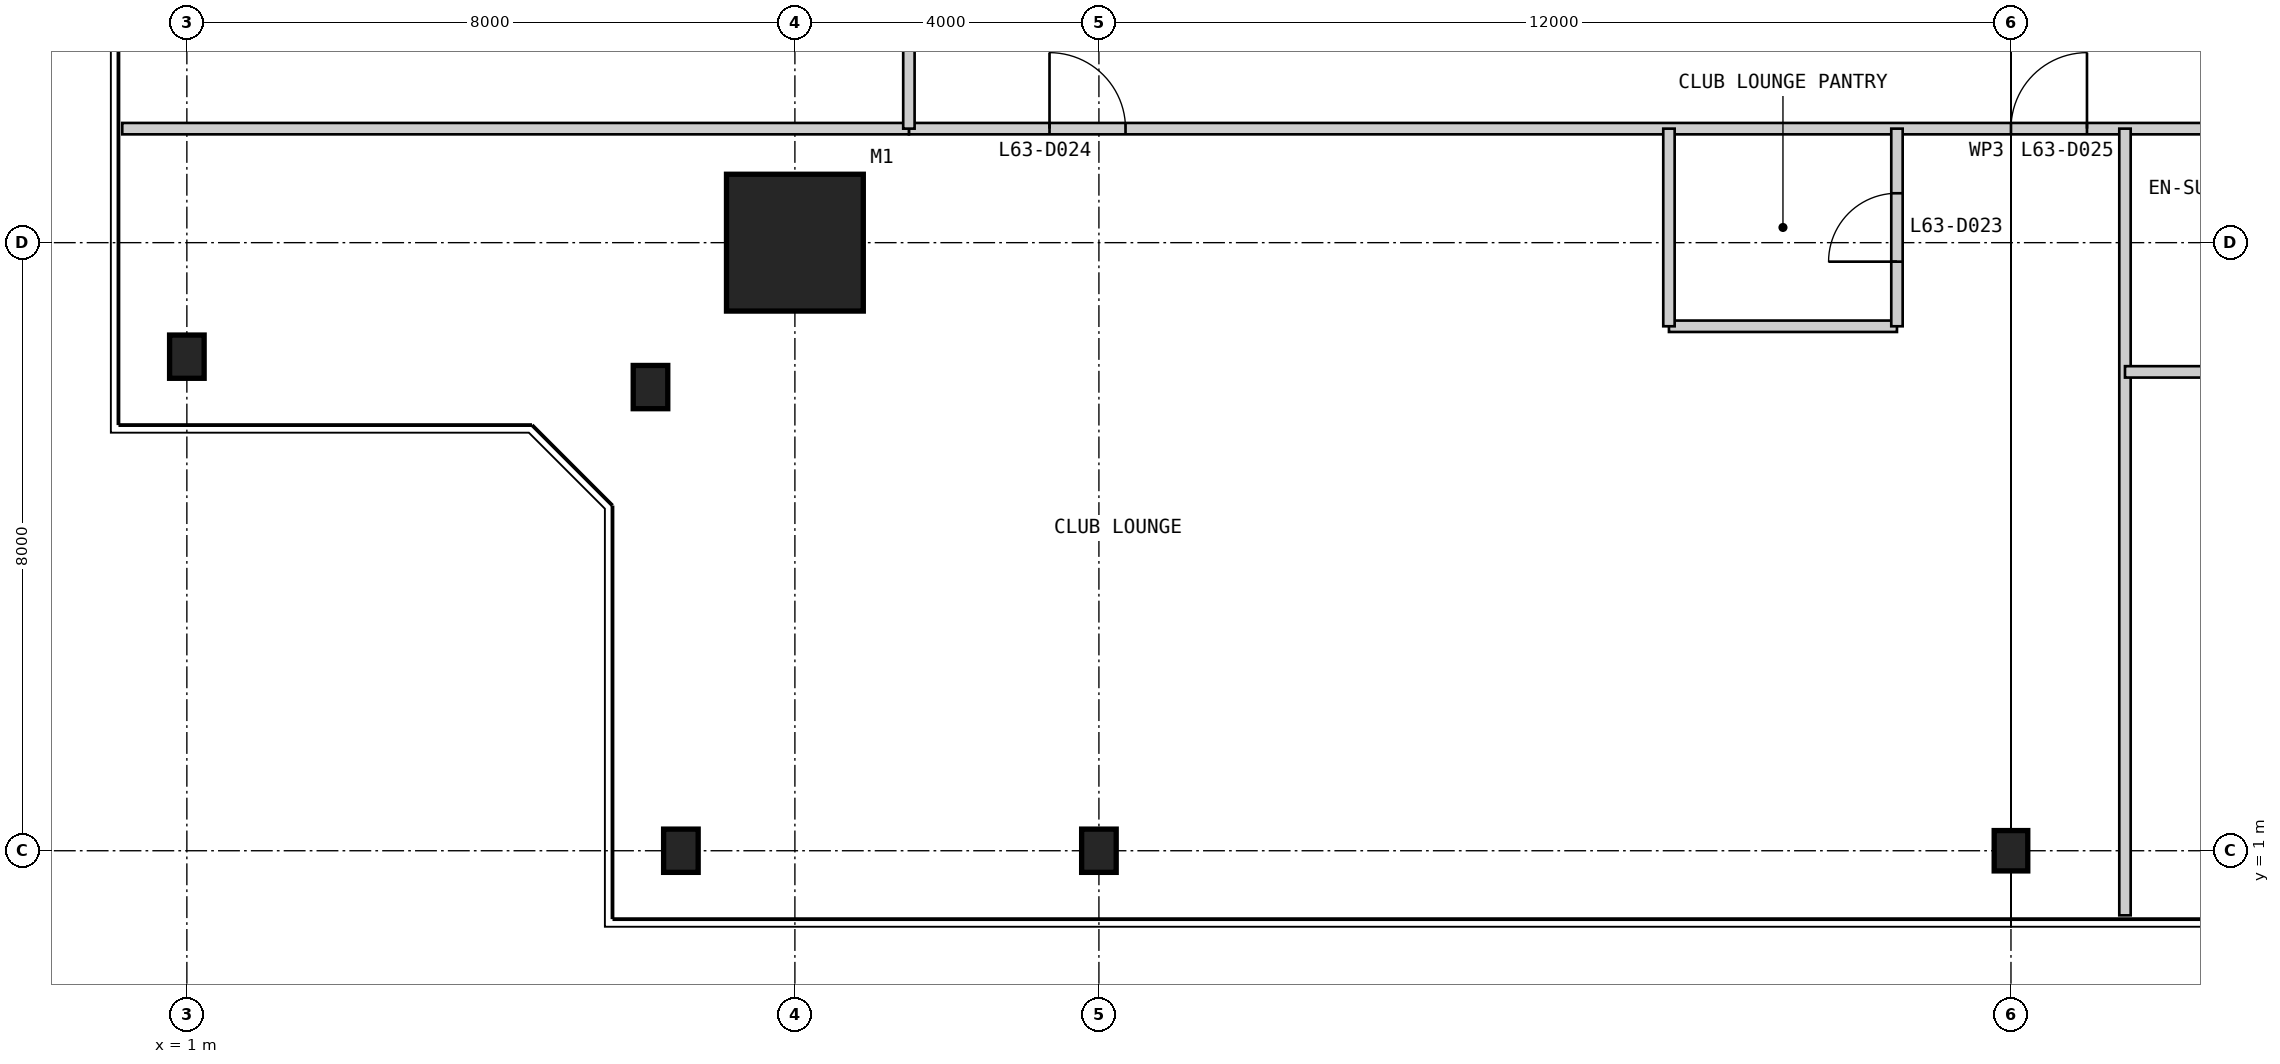
"""IFC4 building model, lengths in metres.
Left out: names, types, materials, properties, quantities, classifications, styles, units other than length and angle.
Written with IfcOpenShell. Run it as: python <this file> out.ifc"""

import sys

from ifc_helpers import new_model, si_unit, direction, frame, frame_2d, origin, origin_2d, place, context, subcontext, project, spatial, rectangle, i_section, extrude, element, fill, save


model = new_model("IFC4")
c1 = context("Model", 3, precision=1e-05, world=origin(), true_north=direction((0.0, 1.0)))
c2 = subcontext(c1, "Body", "Model", "MODEL_VIEW")
j1 = project(units=[si_unit("LENGTHUNIT", "METRE"), si_unit("PLANEANGLEUNIT", "RADIAN")], contexts=[c1])
p1 = place(None, origin())
s1 = spatial("IfcSite", under=j1, at=p1, CompositionType="ELEMENT")
p2 = place(p1, origin())
s2 = spatial("IfcBuilding", under=s1, at=p2, CompositionType="ELEMENT")
p3 = place(p2, frame((0.0, 0.0, 266.2)))
s3 = spatial("IfcBuildingStorey", under=s2, at=p3, CompositionType="ELEMENT", Elevation=266.2)
p4 = place(p3, frame((9.0, 9.0, 0.0), z_axis=(0.0, 0.0, 1.0), x_axis=(1.0, 0.0, 0.0)))
e1 = element("IfcColumn", 1, at=p4, inside=s3, PredefinedType="COLUMN", context=c2, shape_type="SweptSolid", body=[
    extrude(rectangle(XDim=1.8, YDim=1.8, at=origin_2d()), origin(), (0.0, 0.0, 1.0), 3.4),
])
for number, where, z_axis, x_axis in (
    (2, (7.5, 1.0, 0.0), (0.0, 0.0, 1.0), (1.0, 0.0, 0.0)),
    (3, (13.0, 1.0, 0.0), (0.0, 0.0, 1.0), (1.0, 0.0, 0.0)),
):
    element("IfcColumn", number, at=place(p3, frame(where, z_axis=z_axis, x_axis=x_axis)), inside=s3, PredefinedType="COLUMN", context=c2, shape_type="SweptSolid", body=[
        extrude(i_section(OverallWidth=0.455, OverallDepth=0.569, WebThickness=0.078, FlangeThickness=0.125, at=origin_2d()), origin(), (0.0, 0.0, 1.0), 3.4),
    ])
p5 = place(p3, frame((25.0, 1.0, 0.0), z_axis=(0.0, 0.0, 1.0), x_axis=(1.0, 0.0, 0.0)))
e4 = element("IfcColumn", 4, at=p5, inside=s3, PredefinedType="COLUMN", context=c2, shape_type="SweptSolid", body=[
    extrude(i_section(OverallWidth=0.442, OverallDepth=0.531, WebThickness=0.066, FlangeThickness=0.106, at=origin_2d()), origin(), (0.0, 0.0, 1.0), 3.4),
])
for number, where, z_axis, x_axis in (
    (5, (1.0, 7.5, 0.0), (0.0, 0.0, 1.0), (1.0, 0.0, 0.0)),
    (6, (7.1, 7.1, 0.0), (0.0, 0.0, 1.0), (1.0, 0.0, 0.0)),
):
    element("IfcColumn", number, at=place(p3, frame(where, z_axis=z_axis, x_axis=x_axis)), inside=s3, PredefinedType="COLUMN", context=c2, shape_type="SweptSolid", body=[
        extrude(i_section(OverallWidth=0.455, OverallDepth=0.569, WebThickness=0.078, FlangeThickness=0.125, at=origin_2d()), origin(), (0.0, 0.0, 1.0), 3.4),
    ])
p6 = place(p3, frame((10.5, 10.5, 0.0), z_axis=(0.0, 0.0, 1.0), x_axis=(1.0, 0.0, 0.0)))
e7 = element("IfcWall", 7, at=p6, inside=s3, PredefinedType="PARTITIONING", context=c2, shape_type="SweptSolid", body=[
    extrude(rectangle(XDim=29.0, YDim=0.15, at=frame_2d((14.5, 0.0))), origin(), (0.0, 0.0, 1.0), 3.25),
])
p7 = place(p6, frame((1.85, 0.0, 0.0)))
e8 = element("IfcOpeningElement", 8, at=p7, cuts=e7, PredefinedType="OPENING", context=c2, shape_type="SweptSolid", body=[
    extrude(rectangle(XDim=1.0, YDim=2.1, at=frame_2d((0.5, 1.05))), frame((0.0, 0.085, 0.0), z_axis=(0.0, -1.0, 0.0), x_axis=(1.0, 0.0, 0.0)), (0.0, 0.0, 1.0), 0.17),
])
p8 = place(p6, frame((14.5, 0.0, 0.0)))
e9 = element("IfcOpeningElement", 9, at=p8, cuts=e7, PredefinedType="OPENING", context=c2, shape_type="SweptSolid", body=[
    extrude(rectangle(XDim=1.0, YDim=2.1, at=frame_2d((0.5, 1.05))), frame((0.0, 0.085, 0.0), z_axis=(0.0, -1.0, 0.0), x_axis=(1.0, 0.0, 0.0)), (0.0, 0.0, 1.0), 0.17),
])
p9 = place(p6, frame((19.2, 0.0, 0.0)))
e10 = element("IfcOpeningElement", 10, at=p9, cuts=e7, PredefinedType="OPENING", context=c2, shape_type="SweptSolid", body=[
    extrude(rectangle(XDim=0.9, YDim=2.1, at=frame_2d((0.45, 1.05))), frame((0.0, 0.085, 0.0), z_axis=(0.0, -1.0, 0.0), x_axis=(1.0, 0.0, 0.0)), (0.0, 0.0, 1.0), 0.17),
])
p10 = place(p6, frame((25.2, 0.0, 0.0)))
e11 = element("IfcOpeningElement", 11, at=p10, cuts=e7, PredefinedType="OPENING", context=c2, shape_type="SweptSolid", body=[
    extrude(rectangle(XDim=0.9, YDim=2.1, at=frame_2d((0.45, 1.05))), frame((0.0, 0.085, 0.0), z_axis=(0.0, -1.0, 0.0), x_axis=(1.0, 0.0, 0.0)), (0.0, 0.0, 1.0), 0.17),
])
p11 = place(p3, frame((0.15, 10.5, 0.0), z_axis=(0.0, 0.0, 1.0), x_axis=(1.0, 0.0, 0.0)))
e12 = element("IfcWall", 12, at=p11, inside=s3, PredefinedType="PARTITIONING", context=c2, shape_type="SweptSolid", body=[
    extrude(rectangle(XDim=10.35, YDim=0.15, at=frame_2d((5.175, 0.0))), origin(), (0.0, 0.0, 1.0), 3.25),
])
p12 = place(p3, frame((20.5, 7.9, 0.0), z_axis=(0.0, 0.0, 1.0), x_axis=(1.0, 0.0, 0.0)))
e13 = element("IfcWall", 13, at=p12, inside=s3, PredefinedType="PARTITIONING", context=c2, shape_type="SweptSolid", body=[
    extrude(rectangle(XDim=3.0, YDim=0.15, at=frame_2d((1.5, 0.0))), origin(), (0.0, 0.0, 1.0), 3.25),
])
p13 = place(p3, frame((23.5, 7.9, 0.0), z_axis=(0.0, 0.0, 1.0), x_axis=(0.0, 1.0, 0.0)))
e14 = element("IfcWall", 14, at=p13, inside=s3, PredefinedType="PARTITIONING", context=c2, shape_type="SweptSolid", body=[
    extrude(rectangle(XDim=2.6, YDim=0.15, at=frame_2d((1.3, 0.0))), origin(), (0.0, 0.0, 1.0), 3.25),
])
p14 = place(p13, frame((0.85, 0.0, 0.0)))
e15 = element("IfcOpeningElement", 15, at=p14, cuts=e14, PredefinedType="OPENING", context=c2, shape_type="SweptSolid", body=[
    extrude(rectangle(XDim=0.9, YDim=2.1, at=frame_2d((0.45, 1.05))), frame((0.0, 0.085, 0.0), z_axis=(0.0, -1.0, 0.0), x_axis=(1.0, 0.0, 0.0)), (0.0, 0.0, 1.0), 0.17),
])
p15 = place(p3, frame((20.5, 7.9, 0.0), z_axis=(0.0, 0.0, 1.0), x_axis=(0.0, 1.0, 0.0)))
e16 = element("IfcWall", 16, at=p15, inside=s3, PredefinedType="PARTITIONING", context=c2, shape_type="SweptSolid", body=[
    extrude(rectangle(XDim=2.6, YDim=0.15, at=frame_2d((1.3, 0.0))), origin(), (0.0, 0.0, 1.0), 3.25),
])
p16 = place(p3, frame((26.5, 0.15, 0.0), z_axis=(0.0, 0.0, 1.0), x_axis=(0.0, 1.0, 0.0)))
e17 = element("IfcWall", 17, at=p16, inside=s3, PredefinedType="PARTITIONING", context=c2, shape_type="SweptSolid", body=[
    extrude(rectangle(XDim=10.35, YDim=0.15, at=frame_2d((5.175, 0.0))), origin(), (0.0, 0.0, 1.0), 3.25),
])
p17 = place(p3, frame((26.5, 7.3, 0.0), z_axis=(0.0, 0.0, 1.0), x_axis=(1.0, 0.0, 0.0)))
e18 = element("IfcWall", 18, at=p17, inside=s3, PredefinedType="PARTITIONING", context=c2, shape_type="SweptSolid", body=[
    extrude(rectangle(XDim=2.6, YDim=0.15, at=frame_2d((1.3, 0.0))), origin(), (0.0, 0.0, 1.0), 3.25),
])
p18 = place(p3, frame((10.5, 39.5, 0.0), z_axis=(0.0, 0.0, 1.0), x_axis=(0.0, -1.0, 0.0)))
e19 = element("IfcWall", 19, at=p18, inside=s3, PredefinedType="PARTITIONING", context=c2, shape_type="SweptSolid", body=[
    extrude(rectangle(XDim=29.0, YDim=0.15, at=frame_2d((14.5, 0.0))), origin(), (0.0, 0.0, 1.0), 3.25),
])
p19 = place(p18, frame((2.4, 0.0, 0.0)))
e20 = element("IfcOpeningElement", 20, at=p19, cuts=e19, PredefinedType="OPENING", context=c2, shape_type="SweptSolid", body=[
    extrude(rectangle(XDim=0.9, YDim=2.1, at=frame_2d((0.45, 1.05))), frame((0.0, 0.085, 0.0), z_axis=(0.0, -1.0, 0.0), x_axis=(1.0, 0.0, 0.0)), (0.0, 0.0, 1.0), 0.17),
])
p20 = place(p18, frame((7.2, 0.0, 0.0)))
e21 = element("IfcOpeningElement", 21, at=p20, cuts=e19, PredefinedType="OPENING", context=c2, shape_type="SweptSolid", body=[
    extrude(rectangle(XDim=0.9, YDim=2.1, at=frame_2d((0.45, 1.05))), frame((0.0, 0.085, 0.0), z_axis=(0.0, -1.0, 0.0), x_axis=(1.0, 0.0, 0.0)), (0.0, 0.0, 1.0), 0.17),
])
p21 = place(p18, frame((13.6, 0.0, 0.0)))
e22 = element("IfcOpeningElement", 22, at=p21, cuts=e19, PredefinedType="OPENING", context=c2, shape_type="SweptSolid", body=[
    extrude(rectangle(XDim=0.9, YDim=2.1, at=frame_2d((0.45, 1.05))), frame((0.0, 0.085, 0.0), z_axis=(0.0, -1.0, 0.0), x_axis=(1.0, 0.0, 0.0)), (0.0, 0.0, 1.0), 0.17),
])
p22 = place(p18, frame((25.2, 0.0, 0.0)))
e23 = element("IfcOpeningElement", 23, at=p22, cuts=e19, PredefinedType="OPENING", context=c2, shape_type="SweptSolid", body=[
    extrude(rectangle(XDim=0.9, YDim=2.1, at=frame_2d((0.45, 1.05))), frame((0.0, 0.085, 0.0), z_axis=(0.0, -1.0, 0.0), x_axis=(1.0, 0.0, 0.0)), (0.0, 0.0, 1.0), 0.17),
])
p23 = place(p14, origin())
e24 = element("IfcDoor", 24, at=p23, inside=s3, OperationType="SINGLE_SWING_LEFT", PredefinedType="DOOR", context=c2, shape_type="SweptSolid", body=[
    extrude(rectangle(XDim=0.9, YDim=2.1, at=frame_2d((0.45, 1.05))), frame((0.0, 0.025, 0.0), z_axis=(0.0, -1.0, 0.0), x_axis=(1.0, 0.0, 0.0)), (0.0, 0.0, 1.0), 0.05),
])
fill(e15, e24)
p24 = place(p7, origin())
e25 = element("IfcDoor", 25, at=p24, inside=s3, OperationType="SINGLE_SWING_LEFT", PredefinedType="DOOR", context=c2, shape_type="SweptSolid", body=[
    extrude(rectangle(XDim=1.0, YDim=2.1, at=frame_2d((0.5, 1.05))), frame((0.0, 0.025, 0.0), z_axis=(0.0, -1.0, 0.0), x_axis=(1.0, 0.0, 0.0)), (0.0, 0.0, 1.0), 0.05),
])
fill(e8, e25)
p25 = place(p8, origin())
e26 = element("IfcDoor", 26, at=p25, inside=s3, OperationType="SINGLE_SWING_RIGHT", PredefinedType="DOOR", context=c2, shape_type="SweptSolid", body=[
    extrude(rectangle(XDim=1.0, YDim=2.1, at=frame_2d((0.5, 1.05))), frame((0.0, 0.025, 0.0), z_axis=(0.0, -1.0, 0.0), x_axis=(1.0, 0.0, 0.0)), (0.0, 0.0, 1.0), 0.05),
])
fill(e9, e26)
save(model, sys.argv[1])
